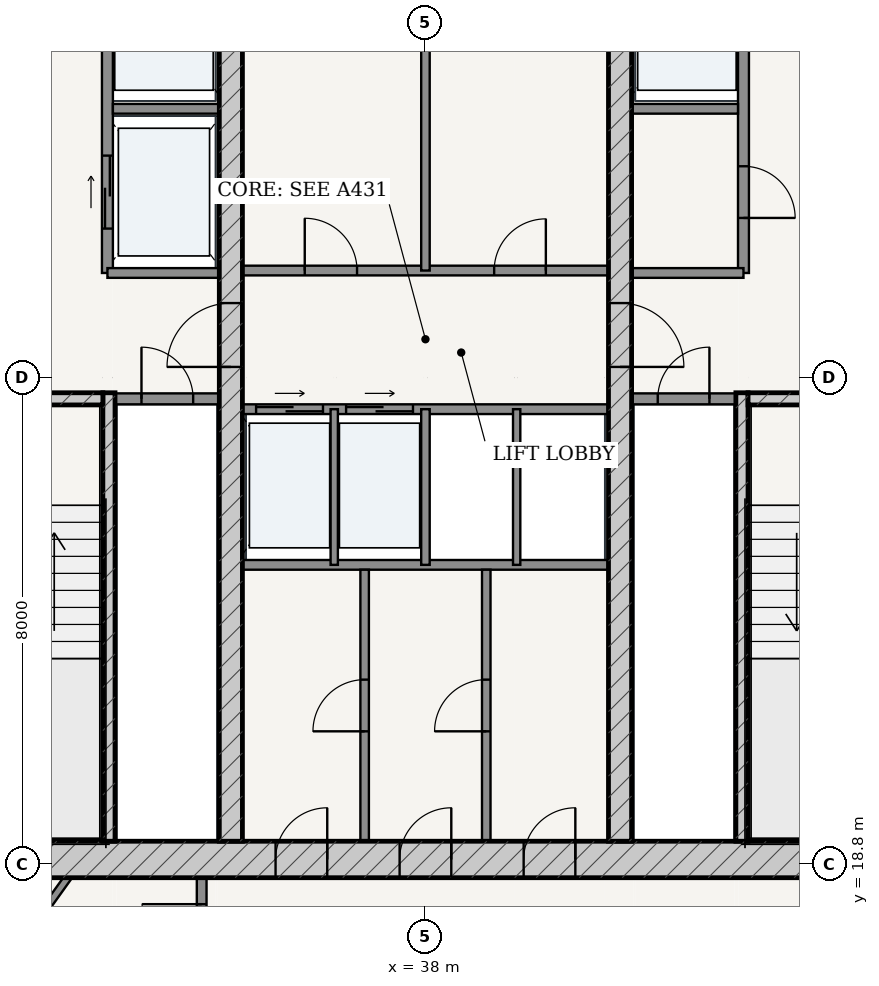
"""IFC4 building model, lengths in metres.
Left out: names, types, materials, properties, quantities, classifications, styles, units other than length and angle.
Written with IfcOpenShell. Run it as: python <this file> out.ifc"""

import sys

from ifc_helpers import new_model, si_unit, direction, frame, frame_2d, origin, place, context, subcontext, project, spatial, rectangle, extrude, source, transform, mapped, element, fill, save


model = new_model("IFC4")
c1 = context("Model", 3, precision=1e-05, world=origin(), true_north=direction((-0.2419218956, 0.970295726276)))
c2 = subcontext(c1, "Body", "Model", "MODEL_VIEW")
j1 = project(units=[si_unit("LENGTHUNIT", "METRE"), si_unit("PLANEANGLEUNIT", "RADIAN")], contexts=[c1])
p1 = place(None, origin())
s1 = spatial("IfcSite", under=j1, at=p1, CompositionType="ELEMENT")
p2 = place(p1, origin())
s2 = spatial("IfcBuilding", under=s1, at=p2, CompositionType="ELEMENT")
p3 = place(p2, frame((0.0, 0.0, 235.6)))
s3 = spatial("IfcBuildingStorey", under=s2, at=p3, CompositionType="ELEMENT", Elevation=235.6)
p4 = place(p3, frame((28.775, 18.875, 0.0), z_axis=(0.0, 0.0, 1.0), x_axis=(1.0, 0.0, 0.0)))
e1 = element("IfcWall", 1, at=p4, inside=s3, PredefinedType="SHEAR", context=c2, shape_type="SweptSolid", body=[
    extrude(rectangle(XDim=18.45, YDim=0.6, at=frame_2d((9.225, 0.0))), origin(), (0.0, 0.0, 1.0), 3.435),
])
p5 = place(p4, frame((6.76, 0.0, 0.0)))
e2 = element("IfcOpeningElement", 2, at=p5, cuts=e1, PredefinedType="OPENING", context=c2, shape_type="SweptSolid", body=[
    extrude(rectangle(XDim=0.85, YDim=2.1, at=frame_2d((0.425, 1.05))), frame((0.0, 0.31, 0.0), z_axis=(0.0, -1.0, 0.0), x_axis=(1.0, 0.0, 0.0)), (0.0, 0.0, 1.0), 0.62),
])
p6 = place(p4, frame((8.8, 0.0, 0.0)))
e3 = element("IfcOpeningElement", 3, at=p6, cuts=e1, PredefinedType="OPENING", context=c2, shape_type="SweptSolid", body=[
    extrude(rectangle(XDim=0.85, YDim=2.1, at=frame_2d((0.425, 1.05))), frame((0.0, 0.31, 0.0), z_axis=(0.0, -1.0, 0.0), x_axis=(1.0, 0.0, 0.0)), (0.0, 0.0, 1.0), 0.62),
])
p7 = place(p4, frame((10.84, 0.0, 0.0)))
e4 = element("IfcOpeningElement", 4, at=p7, cuts=e1, PredefinedType="OPENING", context=c2, shape_type="SweptSolid", body=[
    extrude(rectangle(XDim=0.85, YDim=2.1, at=frame_2d((0.425, 1.05))), frame((0.0, 0.31, 0.0), z_axis=(0.0, -1.0, 0.0), x_axis=(1.0, 0.0, 0.0)), (0.0, 0.0, 1.0), 0.62),
])
p8 = place(p3, frame((32.795, 19.175, 0.0), z_axis=(0.0, 0.0, 1.0), x_axis=(0.0, 1.0, 0.0)))
e5 = element("IfcWall", 5, at=p8, inside=s3, PredefinedType="SOLIDWALL", context=c2, shape_type="SweptSolid", body=[
    extrude(rectangle(XDim=7.375, YDim=0.2, at=frame_2d((3.688, 0.0))), origin(), (0.0, 0.0, 1.0), 3.435),
])
p9 = place(p3, frame((29.375, 26.45, 0.0), z_axis=(0.0, 0.0, 1.0), x_axis=(1.0, 0.0, 0.0)))
e6 = element("IfcWall", 6, at=p9, inside=s3, PredefinedType="SOLIDWALL", context=c2, shape_type="SweptSolid", body=[
    extrude(rectangle(XDim=3.32, YDim=0.2, at=frame_2d((1.66, 0.0))), origin(), (0.0, 0.0, 1.0), 3.435),
])
p10 = place(p9, frame((1.185, 0.0, 0.0)))
e7 = element("IfcOpeningElement", 7, at=p10, cuts=e6, PredefinedType="OPENING", context=c2, shape_type="SweptSolid", body=[
    extrude(rectangle(XDim=0.95, YDim=2.15, at=frame_2d((0.475, 1.075))), frame((0.0, 0.11, 0.0), z_axis=(0.0, -1.0, 0.0), x_axis=(1.0, 0.0, 0.0)), (0.0, 0.0, 1.0), 0.22),
])
p11 = place(p3, frame((43.205, 19.175, 0.0), z_axis=(0.0, 0.0, 1.0), x_axis=(0.0, 1.0, 0.0)))
e8 = element("IfcWall", 8, at=p11, inside=s3, PredefinedType="SOLIDWALL", context=c2, shape_type="SweptSolid", body=[
    extrude(rectangle(XDim=7.375, YDim=0.2, at=frame_2d((3.688, 0.0))), origin(), (0.0, 0.0, 1.0), 3.435),
])
p12 = place(p3, frame((43.305, 26.45, 0.0), z_axis=(0.0, 0.0, 1.0), x_axis=(1.0, 0.0, 0.0)))
e9 = element("IfcWall", 9, at=p12, inside=s3, PredefinedType="SOLIDWALL", context=c2, shape_type="SweptSolid", body=[
    extrude(rectangle(XDim=3.32, YDim=0.2, at=frame_2d((1.66, 0.0))), origin(), (0.0, 0.0, 1.0), 3.435),
])
p13 = place(p12, frame((1.185, 0.0, 0.0)))
e10 = element("IfcOpeningElement", 10, at=p13, cuts=e9, PredefinedType="OPENING", context=c2, shape_type="SweptSolid", body=[
    extrude(rectangle(XDim=0.95, YDim=2.15, at=frame_2d((0.475, 1.075))), frame((0.0, 0.11, 0.0), z_axis=(0.0, -1.0, 0.0), x_axis=(1.0, 0.0, 0.0)), (0.0, 0.0, 1.0), 0.22),
])
p14 = place(p3, frame((34.8, 19.175, 0.0), z_axis=(0.0, 0.0, 1.0), x_axis=(0.0, 1.0, 0.0)))
e11 = element("IfcWall", 11, at=p14, inside=s3, PredefinedType="SHEAR", context=c2, shape_type="SweptSolid", body=[
    extrude(rectangle(XDim=15.25, YDim=0.38, at=frame_2d((7.625, 0.0))), origin(), (0.0, 0.0, 1.0), 3.435),
])
p15 = place(p14, frame((7.8, 0.0, 0.0)))
e12 = element("IfcOpeningElement", 12, at=p15, cuts=e11, PredefinedType="OPENING", context=c2, shape_type="SweptSolid", body=[
    extrude(rectangle(XDim=1.05, YDim=2.15, at=frame_2d((0.525, 1.075))), frame((0.0, 0.2, 0.0), z_axis=(0.0, -1.0, 0.0), x_axis=(1.0, 0.0, 0.0)), (0.0, 0.0, 1.0), 0.4),
])
p16 = place(p3, frame((41.2, 19.175, 0.0), z_axis=(0.0, 0.0, 1.0), x_axis=(0.0, 1.0, 0.0)))
e13 = element("IfcWall", 13, at=p16, inside=s3, PredefinedType="SHEAR", context=c2, shape_type="SweptSolid", body=[
    extrude(rectangle(XDim=15.25, YDim=0.38, at=frame_2d((7.625, 0.0))), origin(), (0.0, 0.0, 1.0), 3.435),
])
p17 = place(p16, frame((7.8, 0.0, 0.0)))
e14 = element("IfcOpeningElement", 14, at=p17, cuts=e13, PredefinedType="OPENING", context=c2, shape_type="SweptSolid", body=[
    extrude(rectangle(XDim=1.05, YDim=2.15, at=frame_2d((0.525, 1.075))), frame((0.0, 0.2, 0.0), z_axis=(0.0, -1.0, 0.0), x_axis=(1.0, 0.0, 0.0)), (0.0, 0.0, 1.0), 0.4),
])
p18 = place(p3, frame((32.9, 26.45, 0.0), z_axis=(0.0, 0.0, 1.0), x_axis=(1.0, 0.0, 0.0)))
e15 = element("IfcWall", 15, at=p18, inside=s3, PredefinedType="PARTITIONING", context=c2, shape_type="SweptSolid", body=[
    extrude(rectangle(XDim=1.71, YDim=0.18, at=frame_2d((0.855, 0.0))), origin(), (0.0, 0.0, 1.0), 3.435),
])
p19 = place(p18, frame((0.43, 0.0, 0.0)))
e16 = element("IfcOpeningElement", 16, at=p19, cuts=e15, PredefinedType="OPENING", context=c2, shape_type="SweptSolid", body=[
    extrude(rectangle(XDim=0.85, YDim=2.1, at=frame_2d((0.425, 1.05))), frame((0.0, 0.1, 0.0), z_axis=(0.0, -1.0, 0.0), x_axis=(1.0, 0.0, 0.0)), (0.0, 0.0, 1.0), 0.2),
])
p20 = place(p3, frame((41.39, 26.45, 0.0), z_axis=(0.0, 0.0, 1.0), x_axis=(1.0, 0.0, 0.0)))
e17 = element("IfcWall", 17, at=p20, inside=s3, PredefinedType="PARTITIONING", context=c2, shape_type="SweptSolid", body=[
    extrude(rectangle(XDim=1.71, YDim=0.18, at=frame_2d((0.855, 0.0))), origin(), (0.0, 0.0, 1.0), 3.435),
])
p21 = place(p20, frame((0.43, 0.0, 0.0)))
e18 = element("IfcOpeningElement", 18, at=p21, cuts=e17, PredefinedType="OPENING", context=c2, shape_type="SweptSolid", body=[
    extrude(rectangle(XDim=0.85, YDim=2.1, at=frame_2d((0.425, 1.05))), frame((0.0, 0.1, 0.0), z_axis=(0.0, -1.0, 0.0), x_axis=(1.0, 0.0, 0.0)), (0.0, 0.0, 1.0), 0.2),
])
p22 = place(p3, frame((32.77, 28.52, 0.0), z_axis=(0.0, 0.0, 1.0), x_axis=(0.0, 1.0, 0.0)))
e19 = element("IfcWall", 19, at=p22, inside=s3, PredefinedType="PARTITIONING", context=c2, shape_type="SweptSolid", body=[
    extrude(rectangle(XDim=5.905, YDim=0.18, at=frame_2d((2.953, 0.0))), origin(), (0.0, 0.0, 1.0), 3.435),
])
p23 = place(p22, frame((3.655, 0.0, 0.0)))
e20 = element("IfcOpeningElement", 20, at=p23, cuts=e19, PredefinedType="OPENING", context=c2, shape_type="SweptSolid", body=[
    extrude(rectangle(XDim=1.15, YDim=2.2, at=frame_2d((0.575, 1.1))), frame((0.0, 0.1, 0.0), z_axis=(0.0, -1.0, 0.0), x_axis=(1.0, 0.0, 0.0)), (0.0, 0.0, 1.0), 0.2),
])
p24 = place(p22, frame((0.73, 0.0, 0.0)))
e21 = element("IfcOpeningElement", 21, at=p24, cuts=e19, PredefinedType="OPENING", context=c2, shape_type="SweptSolid", body=[
    extrude(rectangle(XDim=1.2, YDim=2.25, at=frame_2d((0.6, 1.125))), frame((0.0, 0.1, 0.0), z_axis=(0.0, -1.0, 0.0), x_axis=(1.0, 0.0, 0.0)), (0.0, 0.0, 1.0), 0.2),
])
p25 = place(p3, frame((32.86, 31.22, 0.0), z_axis=(0.0, 0.0, 1.0), x_axis=(1.0, 0.0, 0.0)))
e22 = element("IfcWall", 22, at=p25, inside=s3, PredefinedType="PARTITIONING", context=c2, shape_type="SweptSolid", body=[
    extrude(rectangle(XDim=1.75, YDim=0.16, at=frame_2d((0.875, 0.0))), origin(), (0.0, 0.0, 1.0), 3.435),
])
p26 = place(p3, frame((32.77, 28.52, 0.0), z_axis=(0.0, 0.0, 1.0), x_axis=(1.0, 0.0, 0.0)))
e23 = element("IfcWall", 23, at=p26, inside=s3, PredefinedType="PARTITIONING", context=c2, shape_type="SweptSolid", body=[
    extrude(rectangle(XDim=1.84, YDim=0.16, at=frame_2d((0.92, 0.0))), origin(), (0.0, 0.0, 1.0), 3.435),
])
p27 = place(p3, frame((43.23, 28.52, 0.0), z_axis=(0.0, 0.0, 1.0), x_axis=(0.0, 1.0, 0.0)))
e24 = element("IfcWall", 24, at=p27, inside=s3, PredefinedType="PARTITIONING", context=c2, shape_type="SweptSolid", body=[
    extrude(rectangle(XDim=5.905, YDim=0.18, at=frame_2d((2.953, 0.0))), origin(), (0.0, 0.0, 1.0), 3.435),
])
p28 = place(p27, frame((0.905, 0.0, 0.0)))
e25 = element("IfcOpeningElement", 25, at=p28, cuts=e24, PredefinedType="OPENING", context=c2, shape_type="SweptSolid", body=[
    extrude(rectangle(XDim=0.85, YDim=2.1, at=frame_2d((0.425, 1.05))), frame((0.0, 0.1, 0.0), z_axis=(0.0, -1.0, 0.0), x_axis=(1.0, 0.0, 0.0)), (0.0, 0.0, 1.0), 0.2),
])
p29 = place(p27, frame((3.655, 0.0, 0.0)))
e26 = element("IfcOpeningElement", 26, at=p29, cuts=e24, PredefinedType="OPENING", context=c2, shape_type="SweptSolid", body=[
    extrude(rectangle(XDim=1.15, YDim=2.2, at=frame_2d((0.575, 1.1))), frame((0.0, 0.1, 0.0), z_axis=(0.0, -1.0, 0.0), x_axis=(1.0, 0.0, 0.0)), (0.0, 0.0, 1.0), 0.2),
])
p30 = place(p3, frame((41.39, 31.22, 0.0), z_axis=(0.0, 0.0, 1.0), x_axis=(1.0, 0.0, 0.0)))
e27 = element("IfcWall", 27, at=p30, inside=s3, PredefinedType="PARTITIONING", context=c2, shape_type="SweptSolid", body=[
    extrude(rectangle(XDim=1.75, YDim=0.16, at=frame_2d((0.875, 0.0))), origin(), (0.0, 0.0, 1.0), 3.435),
])
p31 = place(p3, frame((41.39, 28.52, 0.0), z_axis=(0.0, 0.0, 1.0), x_axis=(1.0, 0.0, 0.0)))
e28 = element("IfcWall", 28, at=p31, inside=s3, PredefinedType="PARTITIONING", context=c2, shape_type="SweptSolid", body=[
    extrude(rectangle(XDim=1.84, YDim=0.16, at=frame_2d((0.92, 0.0))), origin(), (0.0, 0.0, 1.0), 3.435),
])
p32 = place(p3, frame((34.99, 28.56, 0.0), z_axis=(0.0, 0.0, 1.0), x_axis=(1.0, 0.0, 0.0)))
e29 = element("IfcWall", 29, at=p32, inside=s3, PredefinedType="PARTITIONING", context=c2, shape_type="SweptSolid", body=[
    extrude(rectangle(XDim=6.02, YDim=0.16, at=frame_2d((3.01, 0.0))), origin(), (0.0, 0.0, 1.0), 3.435),
])
p33 = place(p32, frame((1.025, 0.0, 0.0)))
e30 = element("IfcOpeningElement", 30, at=p33, cuts=e29, PredefinedType="OPENING", context=c2, shape_type="SweptSolid", body=[
    extrude(rectangle(XDim=0.86, YDim=2.1, at=frame_2d((0.43, 1.05))), frame((0.0, 0.09, 0.0), z_axis=(0.0, -1.0, 0.0), x_axis=(1.0, 0.0, 0.0)), (0.0, 0.0, 1.0), 0.18),
])
p34 = place(p32, frame((4.14, 0.0, 0.0)))
e31 = element("IfcOpeningElement", 31, at=p34, cuts=e29, PredefinedType="OPENING", context=c2, shape_type="SweptSolid", body=[
    extrude(rectangle(XDim=0.85, YDim=2.1, at=frame_2d((0.425, 1.05))), frame((0.0, 0.09, 0.0), z_axis=(0.0, -1.0, 0.0), x_axis=(1.0, 0.0, 0.0)), (0.0, 0.0, 1.0), 0.18),
])
p35 = place(p3, frame((38.0, 28.56, 0.0), z_axis=(0.0, 0.0, 1.0), x_axis=(0.0, 1.0, 0.0)))
e32 = element("IfcWall", 32, at=p35, inside=s3, PredefinedType="PARTITIONING", context=c2, shape_type="SweptSolid", body=[
    extrude(rectangle(XDim=5.865, YDim=0.14, at=frame_2d((2.933, 0.0))), origin(), (0.0, 0.0, 1.0), 3.435),
])
p36 = place(p3, frame((34.99, 26.28, 0.0), z_axis=(0.0, 0.0, 1.0), x_axis=(1.0, 0.0, 0.0)))
e33 = element("IfcWall", 33, at=p36, inside=s3, PredefinedType="PARTITIONING", context=c2, shape_type="SweptSolid", body=[
    extrude(rectangle(XDim=6.02, YDim=0.16, at=frame_2d((3.01, 0.0))), origin(), (0.0, 0.0, 1.0), 3.435),
])
p37 = place(p36, frame((0.225, 0.0, 0.0)))
e34 = element("IfcOpeningElement", 34, at=p37, cuts=e33, PredefinedType="OPENING", context=c2, shape_type="SweptSolid", body=[
    extrude(rectangle(XDim=1.1, YDim=2.2, at=frame_2d((0.55, 1.1))), frame((0.0, 0.09, 0.0), z_axis=(0.0, -1.0, 0.0), x_axis=(1.0, 0.0, 0.0)), (0.0, 0.0, 1.0), 0.18),
])
p38 = place(p36, frame((1.705, 0.0, 0.0)))
e35 = element("IfcOpeningElement", 35, at=p38, cuts=e33, PredefinedType="OPENING", context=c2, shape_type="SweptSolid", body=[
    extrude(rectangle(XDim=1.1, YDim=2.2, at=frame_2d((0.55, 1.1))), frame((0.0, 0.09, 0.0), z_axis=(0.0, -1.0, 0.0), x_axis=(1.0, 0.0, 0.0)), (0.0, 0.0, 1.0), 0.18),
])
p39 = place(p3, frame((34.99, 23.72, 0.0), z_axis=(0.0, 0.0, 1.0), x_axis=(1.0, 0.0, 0.0)))
e36 = element("IfcWall", 36, at=p39, inside=s3, PredefinedType="PARTITIONING", context=c2, shape_type="SweptSolid", body=[
    extrude(rectangle(XDim=6.02, YDim=0.16, at=frame_2d((3.01, 0.0))), origin(), (0.0, 0.0, 1.0), 3.435),
])
p40 = place(p3, frame((36.5, 23.72, 0.0), z_axis=(0.0, 0.0, 1.0), x_axis=(0.0, 1.0, 0.0)))
e37 = element("IfcWall", 37, at=p40, inside=s3, PredefinedType="PARTITIONING", context=c2, shape_type="SweptSolid", body=[
    extrude(rectangle(XDim=2.56, YDim=0.12, at=frame_2d((1.28, 0.0))), origin(), (0.0, 0.0, 1.0), 3.435),
])
p41 = place(p3, frame((38.0, 23.72, 0.0), z_axis=(0.0, 0.0, 1.0), x_axis=(0.0, 1.0, 0.0)))
e38 = element("IfcWall", 38, at=p41, inside=s3, PredefinedType="PARTITIONING", context=c2, shape_type="SweptSolid", body=[
    extrude(rectangle(XDim=2.56, YDim=0.14, at=frame_2d((1.28, 0.0))), origin(), (0.0, 0.0, 1.0), 3.435),
])
p42 = place(p3, frame((39.5, 23.72, 0.0), z_axis=(0.0, 0.0, 1.0), x_axis=(0.0, 1.0, 0.0)))
e39 = element("IfcWall", 39, at=p42, inside=s3, PredefinedType="PARTITIONING", context=c2, shape_type="SweptSolid", body=[
    extrude(rectangle(XDim=2.56, YDim=0.12, at=frame_2d((1.28, 0.0))), origin(), (0.0, 0.0, 1.0), 3.435),
])
p43 = place(p3, frame((37.0, 19.175, 0.0), z_axis=(0.0, 0.0, 1.0), x_axis=(0.0, 1.0, 0.0)))
e40 = element("IfcWall", 40, at=p43, inside=s3, PredefinedType="PARTITIONING", context=c2, shape_type="SweptSolid", body=[
    extrude(rectangle(XDim=4.465, YDim=0.14, at=frame_2d((2.232, 0.0))), origin(), (0.0, 0.0, 1.0), 3.435),
])
p44 = place(p43, frame((1.808, 0.0, 0.0)))
e41 = element("IfcOpeningElement", 41, at=p44, cuts=e40, PredefinedType="OPENING", context=c2, shape_type="SweptSolid", body=[
    extrude(rectangle(XDim=0.85, YDim=2.1, at=frame_2d((0.425, 1.05))), frame((0.0, 0.08, 0.0), z_axis=(0.0, -1.0, 0.0), x_axis=(1.0, 0.0, 0.0)), (0.0, 0.0, 1.0), 0.16),
])
p45 = place(p3, frame((39.0, 19.175, 0.0), z_axis=(0.0, 0.0, 1.0), x_axis=(0.0, 1.0, 0.0)))
e42 = element("IfcWall", 42, at=p45, inside=s3, PredefinedType="PARTITIONING", context=c2, shape_type="SweptSolid", body=[
    extrude(rectangle(XDim=4.465, YDim=0.14, at=frame_2d((2.232, 0.0))), origin(), (0.0, 0.0, 1.0), 3.435),
])
p46 = place(p45, frame((1.808, 0.0, 0.0)))
e43 = element("IfcOpeningElement", 43, at=p46, cuts=e42, PredefinedType="OPENING", context=c2, shape_type="SweptSolid", body=[
    extrude(rectangle(XDim=0.85, YDim=2.1, at=frame_2d((0.425, 1.05))), frame((0.0, 0.08, 0.0), z_axis=(0.0, -1.0, 0.0), x_axis=(1.0, 0.0, 0.0)), (0.0, 0.0, 1.0), 0.16),
])
p47 = place(p3, frame((34.32, 16.725, 0.0), z_axis=(0.0, 0.0, 1.0), x_axis=(0.0, 1.0, 0.0)))
e44 = element("IfcWall", 44, at=p47, inside=s3, PredefinedType="PARTITIONING", context=c2, shape_type="SweptSolid", body=[
    extrude(rectangle(XDim=1.85, YDim=0.16, at=frame_2d((0.925, 0.0))), origin(), (0.0, 0.0, 1.0), 3.435),
])
p48 = place(p47, frame((0.435, 0.0, 0.0)))
e45 = element("IfcOpeningElement", 45, at=p48, cuts=e44, PredefinedType="OPENING", context=c2, shape_type="SweptSolid", body=[
    extrude(rectangle(XDim=0.98, YDim=2.2, at=frame_2d((0.49, 1.1))), frame((0.0, 0.09, 0.0), z_axis=(0.0, -1.0, 0.0), x_axis=(1.0, 0.0, 0.0)), (0.0, 0.0, 1.0), 0.18),
])
p49 = place(p3, frame((32.117, 18.575, 0.0), z_axis=(0.0, 0.0, 1.0), x_axis=(-0.581800974427, -0.81333119094, 0.0)))
e46 = element("IfcWall", 46, at=p49, inside=s3, PredefinedType="PARTITIONING", context=c2, shape_type="SweptSolid", body=[
    extrude(rectangle(XDim=3.528, YDim=0.12, at=frame_2d((1.764, 0.0))), origin(), (0.0, 0.0, 1.0), 3.435),
])
p50 = place(p49, frame((1.314, 0.0, 0.0)))
e47 = element("IfcOpeningElement", 47, at=p50, cuts=e46, PredefinedType="OPENING", context=c2, shape_type="SweptSolid", body=[
    extrude(rectangle(XDim=0.9, YDim=2.15, at=frame_2d((0.45, 1.075))), frame((0.0, 0.07, 0.0), z_axis=(0.0, -1.0, 0.0), x_axis=(1.0, 0.0, 0.0)), (0.0, 0.0, 1.0), 0.14),
])
m1 = source(origin(), c2, "Body", "SweptSolid", [
    extrude(rectangle(XDim=1.05, YDim=2.15, at=frame_2d((0.525, 1.075))), frame((0.0, 0.025, 0.0), z_axis=(0.0, -1.0, 0.0), x_axis=(1.0, 0.0, 0.0)), (0.0, 0.0, 1.0), 0.05),
])
p51 = place(p15, origin())
e48 = element("IfcDoor", 48, at=p51, inside=s3, OperationType="SINGLE_SWING_LEFT", PredefinedType="DOOR", context=c2, shape_type="MappedRepresentation", body=[
    mapped(m1, transform((0.0, 0.0, 0.0), scale=1.0)),
])
fill(e12, e48)
p52 = place(p17, frame((1.05, 0.0, 0.0), z_axis=(0.0, 0.0, 1.0), x_axis=(-1.0, 0.0, 0.0)))
e49 = element("IfcDoor", 49, at=p52, inside=s3, OperationType="SINGLE_SWING_RIGHT", PredefinedType="DOOR", context=c2, shape_type="MappedRepresentation", body=[
    mapped(m1, transform((0.0, 0.0, 0.0), scale=1.0)),
])
fill(e14, e49)
m2 = source(origin(), c2, "Body", "SweptSolid", [
    extrude(rectangle(XDim=0.85, YDim=2.1, at=frame_2d((0.425, 1.05))), frame((0.0, 0.025, 0.0), z_axis=(0.0, -1.0, 0.0), x_axis=(1.0, 0.0, 0.0)), (0.0, 0.0, 1.0), 0.05),
])
p53 = place(p19, origin())
e50 = element("IfcDoor", 50, at=p53, inside=s3, OperationType="SINGLE_SWING_LEFT", PredefinedType="DOOR", context=c2, shape_type="MappedRepresentation", body=[
    mapped(m2, transform((0.0, 0.0, 0.0), scale=1.0)),
])
fill(e16, e50)
p54 = place(p21, origin())
e51 = element("IfcDoor", 51, at=p54, inside=s3, OperationType="SINGLE_SWING_RIGHT", PredefinedType="DOOR", context=c2, shape_type="MappedRepresentation", body=[
    mapped(m2, transform((0.0, 0.0, 0.0), scale=1.0)),
])
fill(e18, e51)
p55 = place(p28, frame((0.85, 0.0, 0.0), z_axis=(0.0, 0.0, 1.0), x_axis=(-1.0, 0.0, 0.0)))
e52 = element("IfcDoor", 52, at=p55, inside=s3, OperationType="SINGLE_SWING_RIGHT", PredefinedType="DOOR", context=c2, shape_type="MappedRepresentation", body=[
    mapped(m2, transform((0.0, 0.0, 0.0), scale=1.0)),
])
fill(e25, e52)
m3 = source(origin(), c2, "Body", "SweptSolid", [
    extrude(rectangle(XDim=0.86, YDim=2.1, at=frame_2d((0.43, 1.05))), frame((0.0, 0.025, 0.0), z_axis=(0.0, -1.0, 0.0), x_axis=(1.0, 0.0, 0.0)), (0.0, 0.0, 1.0), 0.05),
])
p56 = place(p33, origin())
e53 = element("IfcDoor", 53, at=p56, inside=s3, OperationType="SINGLE_SWING_LEFT", PredefinedType="DOOR", context=c2, shape_type="MappedRepresentation", body=[
    mapped(m3, transform((0.0, 0.0, 0.0), scale=1.0)),
])
fill(e30, e53)
p57 = place(p34, origin())
e54 = element("IfcDoor", 54, at=p57, inside=s3, OperationType="SINGLE_SWING_RIGHT", PredefinedType="DOOR", context=c2, shape_type="MappedRepresentation", body=[
    mapped(m2, transform((0.0, 0.0, 0.0), scale=1.0)),
])
fill(e31, e54)
p58 = place(p5, origin())
e55 = element("IfcDoor", 55, at=p58, inside=s3, OperationType="SINGLE_SWING_RIGHT", PredefinedType="DOOR", context=c2, shape_type="MappedRepresentation", body=[
    mapped(m2, transform((0.0, 0.0, 0.0), scale=1.0)),
])
fill(e2, e55)
p59 = place(p6, origin())
e56 = element("IfcDoor", 56, at=p59, inside=s3, OperationType="SINGLE_SWING_RIGHT", PredefinedType="DOOR", context=c2, shape_type="MappedRepresentation", body=[
    mapped(m2, transform((0.0, 0.0, 0.0), scale=1.0)),
])
fill(e3, e56)
p60 = place(p7, origin())
e57 = element("IfcDoor", 57, at=p60, inside=s3, OperationType="SINGLE_SWING_RIGHT", PredefinedType="DOOR", context=c2, shape_type="MappedRepresentation", body=[
    mapped(m2, transform((0.0, 0.0, 0.0), scale=1.0)),
])
fill(e4, e57)
p61 = place(p44, origin())
e58 = element("IfcDoor", 58, at=p61, inside=s3, OperationType="SINGLE_SWING_LEFT", PredefinedType="DOOR", context=c2, shape_type="MappedRepresentation", body=[
    mapped(m2, transform((0.0, 0.0, 0.0), scale=1.0)),
])
fill(e41, e58)
p62 = place(p46, origin())
e59 = element("IfcDoor", 59, at=p62, inside=s3, OperationType="SINGLE_SWING_LEFT", PredefinedType="DOOR", context=c2, shape_type="MappedRepresentation", body=[
    mapped(m2, transform((0.0, 0.0, 0.0), scale=1.0)),
])
fill(e43, e59)
m4 = source(origin(), c2, "Body", "SweptSolid", [
    extrude(rectangle(XDim=1.2, YDim=2.25, at=frame_2d((0.6, 1.125))), frame((0.0, 0.025, 0.0), z_axis=(0.0, -1.0, 0.0), x_axis=(1.0, 0.0, 0.0)), (0.0, 0.0, 1.0), 0.05),
])
p63 = place(p24, origin())
e60 = element("IfcDoor", 60, at=p63, inside=s3, OperationType="DOUBLE_DOOR_SLIDING", PredefinedType="DOOR", context=c2, shape_type="MappedRepresentation", body=[
    mapped(m4, transform((0.0, 0.0, 0.0), scale=1.0)),
])
fill(e21, e60)
m5 = source(origin(), c2, "Body", "SweptSolid", [
    extrude(rectangle(XDim=1.1, YDim=2.2, at=frame_2d((0.55, 1.1))), frame((0.0, 0.025, 0.0), z_axis=(0.0, -1.0, 0.0), x_axis=(1.0, 0.0, 0.0)), (0.0, 0.0, 1.0), 0.05),
])
p64 = place(p37, origin())
e61 = element("IfcDoor", 61, at=p64, inside=s3, OperationType="DOUBLE_DOOR_SLIDING", PredefinedType="DOOR", context=c2, shape_type="MappedRepresentation", body=[
    mapped(m5, transform((0.0, 0.0, 0.0), scale=1.0)),
])
fill(e34, e61)
p65 = place(p38, origin())
e62 = element("IfcDoor", 62, at=p65, inside=s3, OperationType="DOUBLE_DOOR_SLIDING", PredefinedType="DOOR", context=c2, shape_type="MappedRepresentation", body=[
    mapped(m5, transform((0.0, 0.0, 0.0), scale=1.0)),
])
fill(e35, e62)
m6 = source(origin(), c2, "Body", "SweptSolid", [
    extrude(rectangle(XDim=0.98, YDim=2.2, at=frame_2d((0.49, 1.1))), frame((0.0, 0.025, 0.0), z_axis=(0.0, -1.0, 0.0), x_axis=(1.0, 0.0, 0.0)), (0.0, 0.0, 1.0), 0.05),
])
p66 = place(p48, origin())
e63 = element("IfcDoor", 63, at=p66, inside=s3, OperationType="SINGLE_SWING_RIGHT", PredefinedType="DOOR", context=c2, shape_type="MappedRepresentation", body=[
    mapped(m6, transform((0.0, 0.0, 0.0), scale=1.0)),
])
fill(e45, e63)
save(model, sys.argv[1])
